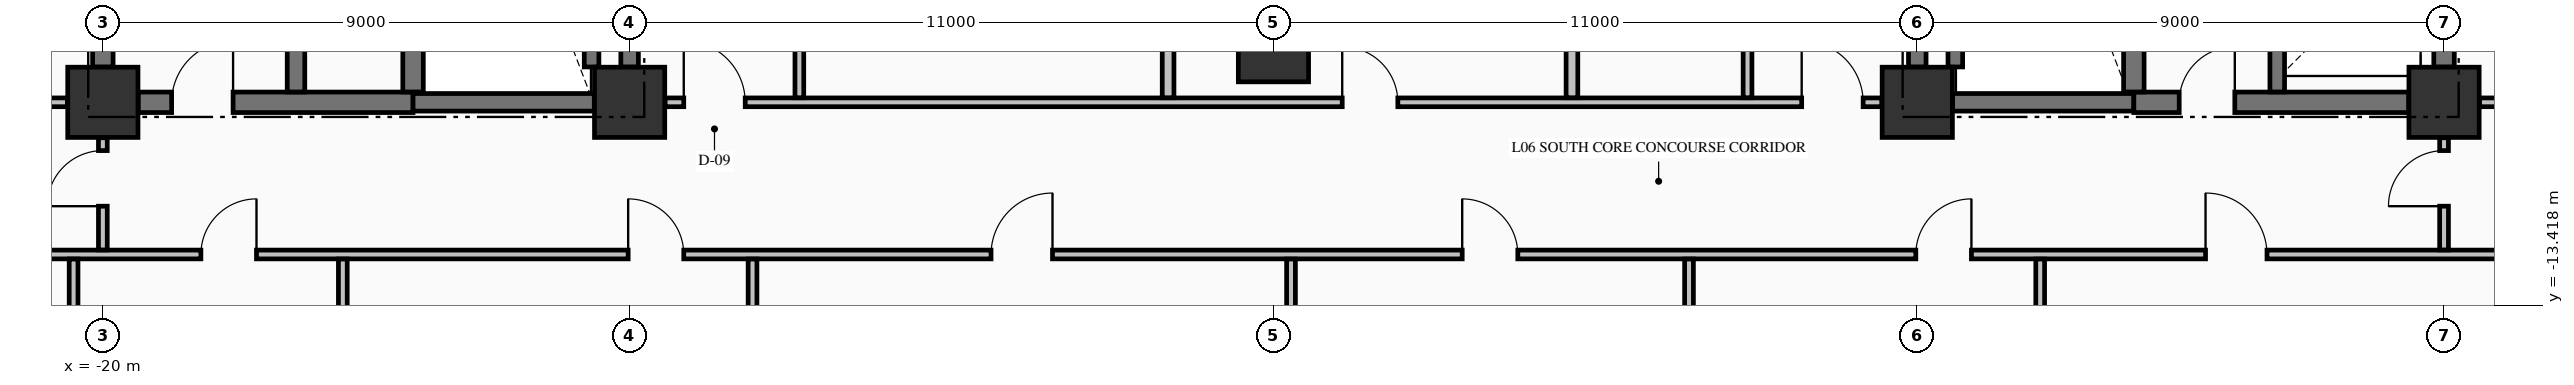
"""IFC4 building model, lengths in metres.
Left out: names, types, materials, properties, quantities, classifications, styles, units other than length and angle.
Written with IfcOpenShell. Run it as: python <this file> out.ifc"""

import sys

from ifc_helpers import new_model, si_unit, direction, frame, frame_2d, origin, origin_2d, place, context, subcontext, project, spatial, rectangle, extrude, element, fill, save


model = new_model("IFC4")
c1 = context("Model", 3, precision=1e-05, world=origin(), true_north=direction((0.0, 1.0)))
c2 = subcontext(c1, "Body", "Model", "MODEL_VIEW")
j1 = project(units=[si_unit("LENGTHUNIT", "METRE"), si_unit("PLANEANGLEUNIT", "RADIAN")], contexts=[c1])
p1 = place(None, origin())
s1 = spatial("IfcSite", under=j1, at=p1, CompositionType="ELEMENT")
p2 = place(p1, origin())
s2 = spatial("IfcBuilding", under=s1, at=p2, CompositionType="ELEMENT")
p3 = place(p2, frame((0.0, 0.0, 30.77)))
s3 = spatial("IfcBuildingStorey", under=s2, at=p3, CompositionType="ELEMENT", Elevation=30.77)
for number, where, z_axis, x_axis in (
    (1, (-20.0, -9.95, -0.25), (0.0, 0.0, 1.0), (1.0, 0.0, 0.0)),
    (2, (-11.0, -9.95, -0.25), (0.0, 0.0, 1.0), (1.0, 0.0, 0.0)),
    (3, (11.0, -9.95, -0.25), (0.0, 0.0, 1.0), (1.0, 0.0, 0.0)),
    (4, (20.0, -9.95, -0.25), (0.0, 0.0, 1.0), (1.0, 0.0, 0.0)),
    (5, (0.0, -9.0, -0.25), (0.0, 0.0, 1.0), (1.0, 0.0, 0.0)),
):
    element("IfcColumn", number, at=place(p3, frame(where, z_axis=z_axis, x_axis=x_axis)), inside=s3, PredefinedType="COLUMN", context=c2, shape_type="SweptSolid", body=[
        extrude(rectangle(XDim=1.2, YDim=1.2, at=origin_2d()), origin(), (0.0, 0.0, 1.0), 3.52),
    ])
p4 = place(p3, frame((-19.396, -9.95, 0.0), z_axis=(0.0, 0.0, 1.0), x_axis=(1.0, 0.0, 0.0)))
e6 = element("IfcWall", 6, at=p4, inside=s3, PredefinedType="SHEAR", context=c2, shape_type="SweptSolid", body=[
    extrude(rectangle(XDim=4.696, YDim=0.35, at=frame_2d((2.348, 0.0))), origin(), (0.0, 0.0, 1.0), 3.27),
])
p5 = place(p4, frame((0.571, 0.0, 0.0)))
e7 = element("IfcOpeningElement", 7, at=p5, cuts=e6, PredefinedType="OPENING", context=c2, shape_type="SweptSolid", body=[
    extrude(rectangle(XDim=1.05, YDim=2.15, at=frame_2d((0.525, 1.075))), frame((0.0, 0.185, 0.0), z_axis=(0.0, -1.0, 0.0), x_axis=(1.0, 0.0, 0.0)), (0.0, 0.0, 1.0), 0.37),
])
for number, where, z_axis, x_axis in (
    (8, (-14.7, -9.95, 0.0), (0.0, 0.0, 1.0), (1.0, 0.0, 0.0)),
    (9, (11.604, -9.95, 0.0), (0.0, 0.0, 1.0), (1.0, 0.0, 0.0)),
):
    element("IfcWall", number, at=place(p3, frame(where, z_axis=z_axis, x_axis=x_axis)), inside=s3, PredefinedType="SHEAR", context=c2, shape_type="SweptSolid", body=[
        extrude(rectangle(XDim=3.096, YDim=0.3, at=frame_2d((1.548, 0.0))), origin(), (0.0, 0.0, 1.0), 3.27),
    ])
p6 = place(p3, frame((14.7, -9.95, 0.0), z_axis=(0.0, 0.0, 1.0), x_axis=(1.0, 0.0, 0.0)))
e10 = element("IfcWall", 10, at=p6, inside=s3, PredefinedType="SHEAR", context=c2, shape_type="SweptSolid", body=[
    extrude(rectangle(XDim=4.696, YDim=0.35, at=frame_2d((2.348, 0.0))), origin(), (0.0, 0.0, 1.0), 3.27),
])
p7 = place(p6, frame((0.775, 0.0, 0.0)))
e11 = element("IfcOpeningElement", 11, at=p7, cuts=e10, PredefinedType="OPENING", context=c2, shape_type="SweptSolid", body=[
    extrude(rectangle(XDim=0.95, YDim=2.15, at=frame_2d((0.475, 1.075))), frame((0.0, 0.185, 0.0), z_axis=(0.0, -1.0, 0.0), x_axis=(1.0, 0.0, 0.0)), (0.0, 0.0, 1.0), 0.37),
])
p8 = place(p3, frame((-23.835, -12.55, 0.0), z_axis=(0.0, 0.0, 1.0), x_axis=(1.0, 0.0, 0.0)))
e12 = element("IfcWall", 12, at=p8, inside=s3, PredefinedType="PARTITIONING", context=c2, shape_type="SweptSolid", body=[
    extrude(rectangle(XDim=52.67, YDim=0.15, at=frame_2d((26.335, 0.0))), origin(), (0.0, 0.0, 1.0), 3.27),
])
p9 = place(p8, frame((5.51, 0.0, 0.0)))
e13 = element("IfcOpeningElement", 13, at=p9, cuts=e12, PredefinedType="OPENING", context=c2, shape_type="SweptSolid", body=[
    extrude(rectangle(XDim=0.95, YDim=2.15, at=frame_2d((0.475, 1.075))), frame((0.0, 0.085, 0.0), z_axis=(0.0, -1.0, 0.0), x_axis=(1.0, 0.0, 0.0)), (0.0, 0.0, 1.0), 0.17),
])
p10 = place(p8, frame((12.81, 0.0, 0.0)))
e14 = element("IfcOpeningElement", 14, at=p10, cuts=e12, PredefinedType="OPENING", context=c2, shape_type="SweptSolid", body=[
    extrude(rectangle(XDim=0.95, YDim=2.15, at=frame_2d((0.475, 1.075))), frame((0.0, 0.085, 0.0), z_axis=(0.0, -1.0, 0.0), x_axis=(1.0, 0.0, 0.0)), (0.0, 0.0, 1.0), 0.17),
])
p11 = place(p8, frame((19.01, 0.0, 0.0)))
e15 = element("IfcOpeningElement", 15, at=p11, cuts=e12, PredefinedType="OPENING", context=c2, shape_type="SweptSolid", body=[
    extrude(rectangle(XDim=1.05, YDim=2.15, at=frame_2d((0.525, 1.075))), frame((0.0, 0.085, 0.0), z_axis=(0.0, -1.0, 0.0), x_axis=(1.0, 0.0, 0.0)), (0.0, 0.0, 1.0), 0.17),
])
p12 = place(p8, frame((27.06, 0.0, 0.0)))
e16 = element("IfcOpeningElement", 16, at=p12, cuts=e12, PredefinedType="OPENING", context=c2, shape_type="SweptSolid", body=[
    extrude(rectangle(XDim=0.95, YDim=2.15, at=frame_2d((0.475, 1.075))), frame((0.0, 0.085, 0.0), z_axis=(0.0, -1.0, 0.0), x_axis=(1.0, 0.0, 0.0)), (0.0, 0.0, 1.0), 0.17),
])
p13 = place(p8, frame((34.81, 0.0, 0.0)))
e17 = element("IfcOpeningElement", 17, at=p13, cuts=e12, PredefinedType="OPENING", context=c2, shape_type="SweptSolid", body=[
    extrude(rectangle(XDim=0.95, YDim=2.15, at=frame_2d((0.475, 1.075))), frame((0.0, 0.085, 0.0), z_axis=(0.0, -1.0, 0.0), x_axis=(1.0, 0.0, 0.0)), (0.0, 0.0, 1.0), 0.17),
])
p14 = place(p8, frame((39.76, 0.0, 0.0)))
e18 = element("IfcOpeningElement", 18, at=p14, cuts=e12, PredefinedType="OPENING", context=c2, shape_type="SweptSolid", body=[
    extrude(rectangle(XDim=1.05, YDim=2.15, at=frame_2d((0.525, 1.075))), frame((0.0, 0.085, 0.0), z_axis=(0.0, -1.0, 0.0), x_axis=(1.0, 0.0, 0.0)), (0.0, 0.0, 1.0), 0.17),
])
p15 = place(p3, frame((-23.835, -9.95, 0.0), z_axis=(0.0, 0.0, 1.0), x_axis=(1.0, 0.0, 0.0)))
e19 = element("IfcWall", 19, at=p15, inside=s3, PredefinedType="PARTITIONING", context=c2, shape_type="SweptSolid", body=[
    extrude(rectangle(XDim=3.229, YDim=0.15, at=frame_2d((1.615, 0.0))), origin(), (0.0, 0.0, 1.0), 3.27),
])
p16 = place(p15, frame((1.335, 0.0, 0.0)))
e20 = element("IfcOpeningElement", 20, at=p16, cuts=e19, PredefinedType="OPENING", context=c2, shape_type="SweptSolid", body=[
    extrude(rectangle(XDim=1.0, YDim=2.15, at=frame_2d((0.5, 1.075))), frame((0.0, 0.085, 0.0), z_axis=(0.0, -1.0, 0.0), x_axis=(1.0, 0.0, 0.0)), (0.0, 0.0, 1.0), 0.17),
])
p17 = place(p3, frame((-10.394, -9.95, 0.0), z_axis=(0.0, 0.0, 1.0), x_axis=(1.0, 0.0, 0.0)))
e21 = element("IfcWall", 21, at=p17, inside=s3, PredefinedType="PARTITIONING", context=c2, shape_type="SweptSolid", body=[
    extrude(rectangle(XDim=20.788, YDim=0.15, at=frame_2d((10.394, 0.0))), origin(), (0.0, 0.0, 1.0), 3.27),
])
p18 = place(p17, frame((0.319, 0.0, 0.0)))
e22 = element("IfcOpeningElement", 22, at=p18, cuts=e21, PredefinedType="OPENING", context=c2, shape_type="SweptSolid", body=[
    extrude(rectangle(XDim=1.05, YDim=2.15, at=frame_2d((0.525, 1.075))), frame((0.0, 0.085, 0.0), z_axis=(0.0, -1.0, 0.0), x_axis=(1.0, 0.0, 0.0)), (0.0, 0.0, 1.0), 0.17),
])
p19 = place(p17, frame((19.419, 0.0, 0.0)))
e23 = element("IfcOpeningElement", 23, at=p19, cuts=e21, PredefinedType="OPENING", context=c2, shape_type="SweptSolid", body=[
    extrude(rectangle(XDim=1.05, YDim=2.15, at=frame_2d((0.525, 1.075))), frame((0.0, 0.085, 0.0), z_axis=(0.0, -1.0, 0.0), x_axis=(1.0, 0.0, 0.0)), (0.0, 0.0, 1.0), 0.17),
])
p20 = place(p17, frame((11.569, 0.0, 0.0)))
e24 = element("IfcOpeningElement", 24, at=p20, cuts=e21, PredefinedType="OPENING", context=c2, shape_type="SweptSolid", body=[
    extrude(rectangle(XDim=0.95, YDim=2.15, at=frame_2d((0.475, 1.075))), frame((0.0, 0.085, 0.0), z_axis=(0.0, -1.0, 0.0), x_axis=(1.0, 0.0, 0.0)), (0.0, 0.0, 1.0), 0.17),
])
p21 = place(p3, frame((20.606, -9.95, 0.0), z_axis=(0.0, 0.0, 1.0), x_axis=(1.0, 0.0, 0.0)))
e25 = element("IfcWall", 25, at=p21, inside=s3, PredefinedType="PARTITIONING", context=c2, shape_type="SweptSolid", body=[
    extrude(rectangle(XDim=8.229, YDim=0.15, at=frame_2d((4.115, 0.0))), origin(), (0.0, 0.0, 1.0), 3.27),
])
p22 = place(p21, frame((3.419, 0.0, 0.0)))
e26 = element("IfcOpeningElement", 26, at=p22, cuts=e25, PredefinedType="OPENING", context=c2, shape_type="SweptSolid", body=[
    extrude(rectangle(XDim=0.95, YDim=2.15, at=frame_2d((0.475, 1.075))), frame((0.0, 0.085, 0.0), z_axis=(0.0, -1.0, 0.0), x_axis=(1.0, 0.0, 0.0)), (0.0, 0.0, 1.0), 0.17),
])
p23 = place(p3, frame((-20.0, -9.346, 0.0), z_axis=(0.0, 0.0, 1.0), x_axis=(0.0, 1.0, 0.0)))
e27 = element("IfcWall", 27, at=p23, inside=s3, PredefinedType="SHEAR", context=c2, shape_type="SweptSolid", body=[
    extrude(rectangle(XDim=8.742, YDim=0.35, at=frame_2d((4.371, 0.0))), origin(), (0.0, 0.0, 1.0), 3.27),
])
p24 = place(p3, frame((-16.7, -9.773, 0.0), z_axis=(0.0, 0.0, 1.0), x_axis=(0.0, 1.0, 0.0)))
e28 = element("IfcWall", 28, at=p24, inside=s3, PredefinedType="SHEAR", context=c2, shape_type="SweptSolid", body=[
    extrude(rectangle(XDim=9.371, YDim=0.3, at=frame_2d((4.686, 0.0))), origin(), (0.0, 0.0, 1.0), 3.27),
])
p25 = place(p3, frame((-14.7, -9.773, 0.0), z_axis=(0.0, 0.0, 1.0), x_axis=(0.0, 1.0, 0.0)))
e29 = element("IfcWall", 29, at=p25, inside=s3, PredefinedType="SHEAR", context=c2, shape_type="SweptSolid", body=[
    extrude(rectangle(XDim=9.371, YDim=0.35, at=frame_2d((4.686, 0.0))), origin(), (0.0, 0.0, 1.0), 3.27),
])
p26 = place(p3, frame((-11.65, -9.346, 0.0), z_axis=(0.0, 0.0, 1.0), x_axis=(0.0, 1.0, 0.0)))
e30 = element("IfcWall", 30, at=p26, inside=s3, PredefinedType="SOLIDWALL", context=c2, shape_type="SweptSolid", body=[
    extrude(rectangle(XDim=8.742, YDim=0.25, at=frame_2d((4.371, 0.0))), origin(), (0.0, 0.0, 1.0), 3.27),
])
for number, where, z_axis, x_axis in (
    (31, (-11.0, -9.346, 0.0), (0.0, 0.0, 1.0), (0.0, 1.0, 0.0)),
    (32, (11.0, -9.346, 0.0), (0.0, 0.0, 1.0), (0.0, 1.0, 0.0)),
):
    element("IfcWall", number, at=place(p3, frame(where, z_axis=z_axis, x_axis=x_axis)), inside=s3, PredefinedType="SHEAR", context=c2, shape_type="SweptSolid", body=[
        extrude(rectangle(XDim=8.742, YDim=0.3, at=frame_2d((4.371, 0.0))), origin(), (0.0, 0.0, 1.0), 3.27),
    ])
p27 = place(p3, frame((11.65, -9.346, 0.0), z_axis=(0.0, 0.0, 1.0), x_axis=(0.0, 1.0, 0.0)))
e33 = element("IfcWall", 33, at=p27, inside=s3, PredefinedType="SOLIDWALL", context=c2, shape_type="SweptSolid", body=[
    extrude(rectangle(XDim=8.742, YDim=0.25, at=frame_2d((4.371, 0.0))), origin(), (0.0, 0.0, 1.0), 3.27),
])
p28 = place(p3, frame((14.7, -9.773, 0.0), z_axis=(0.0, 0.0, 1.0), x_axis=(0.0, 1.0, 0.0)))
e34 = element("IfcWall", 34, at=p28, inside=s3, PredefinedType="SHEAR", context=c2, shape_type="SweptSolid", body=[
    extrude(rectangle(XDim=9.371, YDim=0.35, at=frame_2d((4.686, 0.0))), origin(), (0.0, 0.0, 1.0), 3.27),
])
p29 = place(p3, frame((17.15, -9.773, 0.0), z_axis=(0.0, 0.0, 1.0), x_axis=(0.0, 1.0, 0.0)))
e35 = element("IfcWall", 35, at=p29, inside=s3, PredefinedType="SOLIDWALL", context=c2, shape_type="SweptSolid", body=[
    extrude(rectangle(XDim=2.596, YDim=0.25, at=frame_2d((1.298, 0.0))), origin(), (0.0, 0.0, 1.0), 3.27),
])
p30 = place(p3, frame((20.0, -9.346, 0.0), z_axis=(0.0, 0.0, 1.0), x_axis=(0.0, 1.0, 0.0)))
e36 = element("IfcWall", 36, at=p30, inside=s3, PredefinedType="SHEAR", context=c2, shape_type="SweptSolid", body=[
    extrude(rectangle(XDim=2.169, YDim=0.35, at=frame_2d((1.084, 0.0))), origin(), (0.0, 0.0, 1.0), 3.27),
])
p31 = place(p3, frame((-20.5, -22.294, 0.0), z_axis=(0.0, 0.0, 1.0), x_axis=(0.0, 1.0, 0.0)))
e37 = element("IfcWall", 37, at=p31, inside=s3, PredefinedType="PARTITIONING", context=c2, shape_type="SweptSolid", body=[
    extrude(rectangle(XDim=9.666, YDim=0.15, at=frame_2d((4.833, 0.0))), origin(), (0.0, 0.0, 1.0), 3.27),
])
p32 = place(p3, frame((-20.0, -12.472, 0.0), z_axis=(0.0, 0.0, 1.0), x_axis=(0.0, 1.0, 0.0)))
e38 = element("IfcWall", 38, at=p32, inside=s3, PredefinedType="PARTITIONING", context=c2, shape_type="SweptSolid", body=[
    extrude(rectangle(XDim=1.916, YDim=0.15, at=frame_2d((0.958, 0.0))), origin(), (0.0, 0.0, 1.0), 3.27),
])
p33 = place(p32, frame((0.747, 0.0, 0.0)))
e39 = element("IfcOpeningElement", 39, at=p33, cuts=e38, PredefinedType="OPENING", context=c2, shape_type="SweptSolid", body=[
    extrude(rectangle(XDim=0.95, YDim=2.15, at=frame_2d((0.475, 1.075))), frame((0.0, 0.085, 0.0), z_axis=(0.0, -1.0, 0.0), x_axis=(1.0, 0.0, 0.0)), (0.0, 0.0, 1.0), 0.17),
])
for number, where, z_axis, x_axis in (
    (40, (-15.9, -26.335, 0.0), (0.0, 0.0, 1.0), (0.0, 1.0, 0.0)),
    (41, (-8.9, -26.335, 0.0), (0.0, 0.0, 1.0), (0.0, 1.0, 0.0)),
):
    element("IfcWall", number, at=place(p3, frame(where, z_axis=z_axis, x_axis=x_axis)), inside=s3, PredefinedType="PARTITIONING", context=c2, shape_type="SweptSolid", body=[
        extrude(rectangle(XDim=13.707, YDim=0.15, at=frame_2d((6.854, 0.0))), origin(), (0.0, 0.0, 1.0), 3.27),
    ])
p34 = place(p3, frame((-8.1, -9.872, 0.0), z_axis=(0.0, 0.0, 1.0), x_axis=(0.0, 1.0, 0.0)))
e42 = element("IfcWall", 42, at=p34, inside=s3, PredefinedType="PARTITIONING", context=c2, shape_type="SweptSolid", body=[
    extrude(rectangle(XDim=10.569, YDim=0.15, at=frame_2d((5.285, 0.0))), origin(), (0.0, 0.0, 1.0), 3.27),
])
p35 = place(p34, frame((4.827, 0.0, 0.0)))
e43 = element("IfcOpeningElement", 43, at=p35, cuts=e42, PredefinedType="OPENING", context=c2, shape_type="SweptSolid", body=[
    extrude(rectangle(XDim=0.95, YDim=2.15, at=frame_2d((0.475, 1.075))), frame((0.0, 0.085, 0.0), z_axis=(0.0, -1.0, 0.0), x_axis=(1.0, 0.0, 0.0)), (0.0, 0.0, 1.0), 0.17),
])
p36 = place(p3, frame((-1.8, -9.872, 0.0), z_axis=(0.0, 0.0, 1.0), x_axis=(0.0, 1.0, 0.0)))
e44 = element("IfcWall", 44, at=p36, inside=s3, PredefinedType="PARTITIONING", context=c2, shape_type="SweptSolid", body=[
    extrude(rectangle(XDim=4.969, YDim=0.2, at=frame_2d((2.484, 0.0))), origin(), (0.0, 0.0, 1.0), 3.27),
])
p37 = place(p3, frame((0.3, -25.794, 0.0), z_axis=(0.0, 0.0, 1.0), x_axis=(0.0, 1.0, 0.0)))
e45 = element("IfcWall", 45, at=p37, inside=s3, PredefinedType="PARTITIONING", context=c2, shape_type="SweptSolid", body=[
    extrude(rectangle(XDim=13.166, YDim=0.15, at=frame_2d((6.583, 0.0))), origin(), (0.0, 0.0, 1.0), 2.61),
])
p38 = place(p3, frame((5.1, -9.872, 0.0), z_axis=(0.0, 0.0, 1.0), x_axis=(0.0, 1.0, 0.0)))
e46 = element("IfcWall", 46, at=p38, inside=s3, PredefinedType="PARTITIONING", context=c2, shape_type="SweptSolid", body=[
    extrude(rectangle(XDim=4.969, YDim=0.2, at=frame_2d((2.484, 0.0))), origin(), (0.0, 0.0, 1.0), 3.27),
])
p39 = place(p3, frame((7.1, -26.335, 0.0), z_axis=(0.0, 0.0, 1.0), x_axis=(0.0, 1.0, 0.0)))
e47 = element("IfcWall", 47, at=p39, inside=s3, PredefinedType="PARTITIONING", context=c2, shape_type="SweptSolid", body=[
    extrude(rectangle(XDim=13.707, YDim=0.15, at=frame_2d((6.854, 0.0))), origin(), (0.0, 0.0, 1.0), 3.27),
])
p40 = place(p3, frame((8.1, -9.872, 0.0), z_axis=(0.0, 0.0, 1.0), x_axis=(0.0, 1.0, 0.0)))
e48 = element("IfcWall", 48, at=p40, inside=s3, PredefinedType="PARTITIONING", context=c2, shape_type="SweptSolid", body=[
    extrude(rectangle(XDim=4.969, YDim=0.15, at=frame_2d((2.484, 0.0))), origin(), (0.0, 0.0, 1.0), 3.27),
])
p41 = place(p40, frame((1.997, 0.0, 0.0)))
e49 = element("IfcOpeningElement", 49, at=p41, cuts=e48, PredefinedType="OPENING", context=c2, shape_type="SweptSolid", body=[
    extrude(rectangle(XDim=0.95, YDim=2.15, at=frame_2d((0.475, 1.075))), frame((0.0, 0.085, 0.0), z_axis=(0.0, -1.0, 0.0), x_axis=(1.0, 0.0, 0.0)), (0.0, 0.0, 1.0), 0.17),
])
p42 = place(p3, frame((13.1, -26.335, 0.0), z_axis=(0.0, 0.0, 1.0), x_axis=(0.0, 1.0, 0.0)))
e50 = element("IfcWall", 50, at=p42, inside=s3, PredefinedType="PARTITIONING", context=c2, shape_type="SweptSolid", body=[
    extrude(rectangle(XDim=13.707, YDim=0.15, at=frame_2d((6.854, 0.0))), origin(), (0.0, 0.0, 1.0), 3.27),
])
p43 = place(p3, frame((20.0, -12.472, 0.0), z_axis=(0.0, 0.0, 1.0), x_axis=(0.0, 1.0, 0.0)))
e51 = element("IfcWall", 51, at=p43, inside=s3, PredefinedType="PARTITIONING", context=c2, shape_type="SweptSolid", body=[
    extrude(rectangle(XDim=1.916, YDim=0.15, at=frame_2d((0.958, 0.0))), origin(), (0.0, 0.0, 1.0), 2.61),
])
p44 = place(p43, frame((0.747, 0.0, 0.0)))
e52 = element("IfcOpeningElement", 52, at=p44, cuts=e51, PredefinedType="OPENING", context=c2, shape_type="SweptSolid", body=[
    extrude(rectangle(XDim=0.95, YDim=2.15, at=frame_2d((0.475, 1.075))), frame((0.0, 0.085, 0.0), z_axis=(0.0, -1.0, 0.0), x_axis=(1.0, 0.0, 0.0)), (0.0, 0.0, 1.0), 0.17),
])
p45 = place(p5, origin())
e53 = element("IfcDoor", 53, at=p45, inside=s3, OperationType="SINGLE_SWING_RIGHT", PredefinedType="DOOR", context=c2, shape_type="SweptSolid", body=[
    extrude(rectangle(XDim=1.05, YDim=2.15, at=frame_2d((0.525, 1.075))), frame((0.0, 0.025, 0.0), z_axis=(0.0, -1.0, 0.0), x_axis=(1.0, 0.0, 0.0)), (0.0, 0.0, 1.0), 0.05),
])
fill(e7, e53)
p46 = place(p7, origin())
e54 = element("IfcDoor", 54, at=p46, inside=s3, OperationType="SINGLE_SWING_RIGHT", PredefinedType="DOOR", context=c2, shape_type="SweptSolid", body=[
    extrude(rectangle(XDim=0.95, YDim=2.15, at=frame_2d((0.475, 1.075))), frame((0.0, 0.025, 0.0), z_axis=(0.0, -1.0, 0.0), x_axis=(1.0, 0.0, 0.0)), (0.0, 0.0, 1.0), 0.05),
])
fill(e11, e54)
p47 = place(p18, origin())
e55 = element("IfcDoor", 55, at=p47, inside=s3, OperationType="SINGLE_SWING_LEFT", PredefinedType="DOOR", context=c2, shape_type="SweptSolid", body=[
    extrude(rectangle(XDim=1.05, YDim=2.15, at=frame_2d((0.525, 1.075))), frame((0.0, 0.025, 0.0), z_axis=(0.0, -1.0, 0.0), x_axis=(1.0, 0.0, 0.0)), (0.0, 0.0, 1.0), 0.05),
])
fill(e22, e55)
p48 = place(p19, origin())
e56 = element("IfcDoor", 56, at=p48, inside=s3, OperationType="SINGLE_SWING_LEFT", PredefinedType="DOOR", context=c2, shape_type="SweptSolid", body=[
    extrude(rectangle(XDim=1.05, YDim=2.15, at=frame_2d((0.525, 1.075))), frame((0.0, 0.025, 0.0), z_axis=(0.0, -1.0, 0.0), x_axis=(1.0, 0.0, 0.0)), (0.0, 0.0, 1.0), 0.05),
])
fill(e23, e56)
p49 = place(p9, origin())
e57 = element("IfcDoor", 57, at=p49, inside=s3, OperationType="SINGLE_SWING_RIGHT", PredefinedType="DOOR", context=c2, shape_type="SweptSolid", body=[
    extrude(rectangle(XDim=0.95, YDim=2.15, at=frame_2d((0.475, 1.075))), frame((0.0, 0.025, 0.0), z_axis=(0.0, -1.0, 0.0), x_axis=(1.0, 0.0, 0.0)), (0.0, 0.0, 1.0), 0.05),
])
fill(e13, e57)
p50 = place(p10, origin())
e58 = element("IfcDoor", 58, at=p50, inside=s3, OperationType="SINGLE_SWING_LEFT", PredefinedType="DOOR", context=c2, shape_type="SweptSolid", body=[
    extrude(rectangle(XDim=0.95, YDim=2.15, at=frame_2d((0.475, 1.075))), frame((0.0, 0.025, 0.0), z_axis=(0.0, -1.0, 0.0), x_axis=(1.0, 0.0, 0.0)), (0.0, 0.0, 1.0), 0.05),
])
fill(e14, e58)
p51 = place(p11, origin())
e59 = element("IfcDoor", 59, at=p51, inside=s3, OperationType="SINGLE_SWING_RIGHT", PredefinedType="DOOR", context=c2, shape_type="SweptSolid", body=[
    extrude(rectangle(XDim=1.05, YDim=2.15, at=frame_2d((0.525, 1.075))), frame((0.0, 0.025, 0.0), z_axis=(0.0, -1.0, 0.0), x_axis=(1.0, 0.0, 0.0)), (0.0, 0.0, 1.0), 0.05),
])
fill(e15, e59)
p52 = place(p12, origin())
e60 = element("IfcDoor", 60, at=p52, inside=s3, OperationType="SINGLE_SWING_LEFT", PredefinedType="DOOR", context=c2, shape_type="SweptSolid", body=[
    extrude(rectangle(XDim=0.95, YDim=2.15, at=frame_2d((0.475, 1.075))), frame((0.0, 0.025, 0.0), z_axis=(0.0, -1.0, 0.0), x_axis=(1.0, 0.0, 0.0)), (0.0, 0.0, 1.0), 0.05),
])
fill(e16, e60)
p53 = place(p13, origin())
e61 = element("IfcDoor", 61, at=p53, inside=s3, OperationType="SINGLE_SWING_RIGHT", PredefinedType="DOOR", context=c2, shape_type="SweptSolid", body=[
    extrude(rectangle(XDim=0.95, YDim=2.15, at=frame_2d((0.475, 1.075))), frame((0.0, 0.025, 0.0), z_axis=(0.0, -1.0, 0.0), x_axis=(1.0, 0.0, 0.0)), (0.0, 0.0, 1.0), 0.05),
])
fill(e17, e61)
p54 = place(p14, origin())
e62 = element("IfcDoor", 62, at=p54, inside=s3, OperationType="SINGLE_SWING_LEFT", PredefinedType="DOOR", context=c2, shape_type="SweptSolid", body=[
    extrude(rectangle(XDim=1.05, YDim=2.15, at=frame_2d((0.525, 1.075))), frame((0.0, 0.025, 0.0), z_axis=(0.0, -1.0, 0.0), x_axis=(1.0, 0.0, 0.0)), (0.0, 0.0, 1.0), 0.05),
])
fill(e18, e62)
p55 = place(p20, origin())
e63 = element("IfcDoor", 63, at=p55, inside=s3, OperationType="SINGLE_SWING_LEFT", PredefinedType="DOOR", context=c2, shape_type="SweptSolid", body=[
    extrude(rectangle(XDim=0.95, YDim=2.15, at=frame_2d((0.475, 1.075))), frame((0.0, 0.025, 0.0), z_axis=(0.0, -1.0, 0.0), x_axis=(1.0, 0.0, 0.0)), (0.0, 0.0, 1.0), 0.05),
])
fill(e24, e63)
p56 = place(p33, origin())
e64 = element("IfcDoor", 64, at=p56, inside=s3, OperationType="SINGLE_SWING_LEFT", PredefinedType="DOOR", context=c2, shape_type="SweptSolid", body=[
    extrude(rectangle(XDim=0.95, YDim=2.15, at=frame_2d((0.475, 1.075))), frame((0.0, 0.025, 0.0), z_axis=(0.0, -1.0, 0.0), x_axis=(1.0, 0.0, 0.0)), (0.0, 0.0, 1.0), 0.05),
])
fill(e39, e64)
p57 = place(p44, origin())
e65 = element("IfcDoor", 65, at=p57, inside=s3, OperationType="SINGLE_SWING_LEFT", PredefinedType="DOOR", context=c2, shape_type="SweptSolid", body=[
    extrude(rectangle(XDim=0.95, YDim=2.15, at=frame_2d((0.475, 1.075))), frame((0.0, 0.025, 0.0), z_axis=(0.0, -1.0, 0.0), x_axis=(1.0, 0.0, 0.0)), (0.0, 0.0, 1.0), 0.05),
])
fill(e52, e65)
save(model, sys.argv[1])
